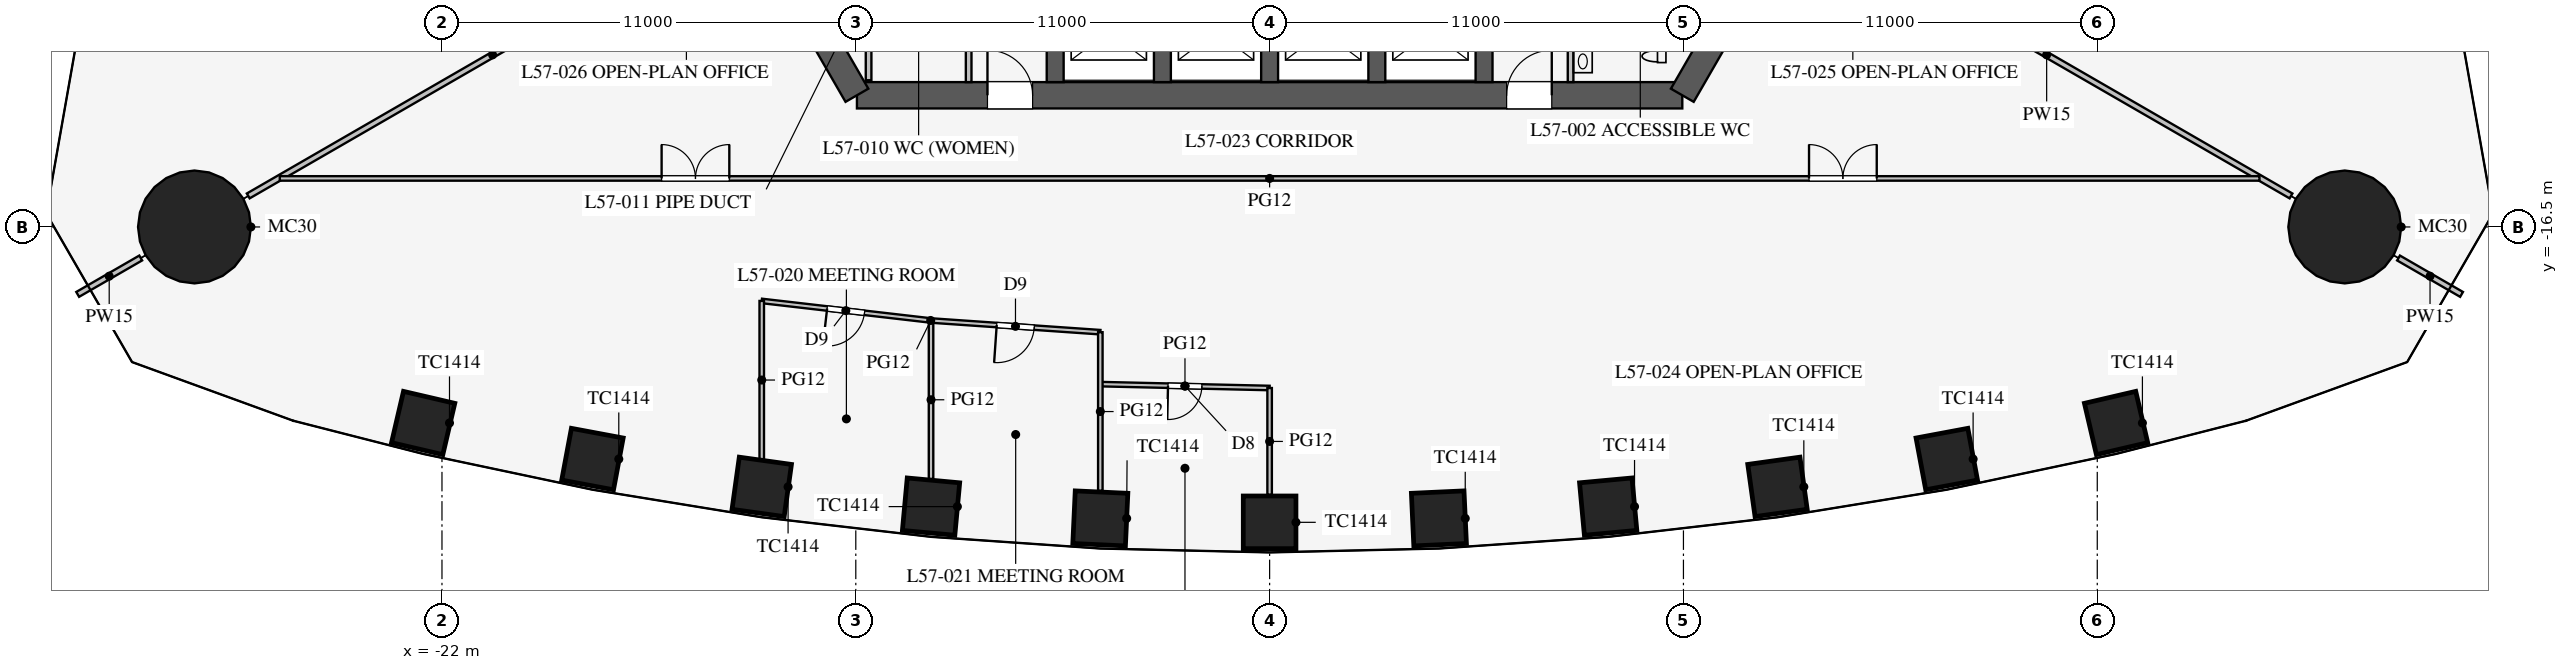
"""IFC4 building model, lengths in metres.
Left out: names, types, materials, properties, quantities, classifications, styles, units other than length and angle.
Written with IfcOpenShell. Run it as: python <this file> out.ifc"""

import sys

from ifc_helpers import new_model, si_unit, direction, frame, frame_2d, origin, origin_2d, place, context, subcontext, project, spatial, rectangle, circle, extrude, element, fill, save


model = new_model("IFC4")
c1 = context("Model", 3, precision=1e-05, world=origin(), true_north=direction((0.0, 1.0)))
c2 = subcontext(c1, "Body", "Model", "MODEL_VIEW")
j1 = project(units=[si_unit("LENGTHUNIT", "METRE"), si_unit("PLANEANGLEUNIT", "RADIAN")], contexts=[c1])
p1 = place(None, origin())
s1 = spatial("IfcSite", under=j1, at=p1, CompositionType="ELEMENT")
p2 = place(p1, origin())
s2 = spatial("IfcBuilding", under=s1, at=p2, CompositionType="ELEMENT")
p3 = place(p2, frame((0.0, 0.0, 248.5)))
s3 = spatial("IfcBuildingStorey", under=s2, at=p3, CompositionType="ELEMENT", Elevation=248.5)
for number, where, z_axis, x_axis in (
    (1, (-22.5, -21.71, 0.0), (0.0, 0.0, 1.0), (0.974, -0.227, 0.0)),
    (2, (-18.0, -22.669, 0.0), (0.0, 0.0, 1.0), (0.983, -0.184, 0.0)),
    (3, (-13.5, -23.408, 0.0), (0.0, 0.0, 1.0), (0.99, -0.138, 0.0)),
    (4, (-9.0, -23.933, 0.0), (0.0, 0.0, 1.0), (0.996, -0.092, 0.0)),
    (5, (-4.5, -24.246, 0.0), (0.0, 0.0, 1.0), (0.999, -0.046, 0.0)),
    (6, (0.0, -24.351, 0.0), (0.0, 0.0, 1.0), (1.0, 0.0, 0.0)),
    (7, (4.5, -24.246, 0.0), (0.0, 0.0, 1.0), (0.999, 0.046, 0.0)),
    (8, (9.0, -23.933, 0.0), (0.0, 0.0, 1.0), (0.996, 0.092, 0.0)),
    (9, (13.5, -23.408, 0.0), (0.0, 0.0, 1.0), (0.99, 0.138, 0.0)),
    (10, (18.0, -22.669, 0.0), (0.0, 0.0, 1.0), (0.983, 0.184, 0.0)),
    (11, (22.5, -21.71, 0.0), (0.0, 0.0, 1.0), (0.974, 0.227, 0.0)),
):
    element("IfcColumn", number, at=place(p3, frame(where, z_axis=z_axis, x_axis=x_axis)), inside=s3, PredefinedType="COLUMN", context=c2, shape_type="SweptSolid", body=[
        extrude(rectangle(XDim=1.4, YDim=1.4, at=origin_2d()), origin(), (0.0, 0.0, 1.0), 4.2),
    ])
for number, where, z_axis, x_axis in (
    (12, (28.579, -16.5, 0.0), (0.0, 0.0, 1.0), (1.0, 0.0, 0.0)),
    (13, (-28.579, -16.5, 0.0), (0.0, 0.0, 1.0), (1.0, 0.0, 0.0)),
):
    element("IfcColumn", number, at=place(p3, frame(where, z_axis=z_axis, x_axis=x_axis)), inside=s3, PredefinedType="COLUMN", context=c2, shape_type="SweptSolid", body=[
        extrude(circle(Radius=1.5, at=origin_2d()), origin(), (0.0, 0.0, 1.0), 4.2),
    ])
p4 = place(p3, frame((-10.97, -13.0, 0.0), z_axis=(0.0, 0.0, 1.0), x_axis=(1.0, 0.0, 0.0)))
e14 = element("IfcWall", 14, at=p4, inside=s3, PredefinedType="SHEAR", context=c2, shape_type="SweptSolid", body=[
    extrude(rectangle(XDim=21.939, YDim=0.7, at=frame_2d((10.97, 0.0))), origin(), (0.0, 0.0, 1.0), 4.2),
])
p5 = place(p4, frame((17.27, 0.0, 0.0)))
e15 = element("IfcOpeningElement", 15, at=p5, cuts=e14, PredefinedType="OPENING", context=c2, shape_type="SweptSolid", body=[
    extrude(rectangle(XDim=1.2, YDim=2.1, at=frame_2d((0.6, 1.05))), frame((0.0, 0.36, 0.0), z_axis=(0.0, -1.0, 0.0), x_axis=(1.0, 0.0, 0.0)), (0.0, 0.0, 1.0), 0.72),
])
p6 = place(p4, frame((3.47, 0.0, 0.0)))
e16 = element("IfcOpeningElement", 16, at=p6, cuts=e14, PredefinedType="OPENING", context=c2, shape_type="SweptSolid", body=[
    extrude(rectangle(XDim=1.2, YDim=2.1, at=frame_2d((0.6, 1.05))), frame((0.0, 0.36, 0.0), z_axis=(0.0, -1.0, 0.0), x_axis=(1.0, 0.0, 0.0)), (0.0, 0.0, 1.0), 0.72),
])
for number, where, z_axis, x_axis in (
    (17, (10.97, -13.0, 0.0), (0.0, 0.0, 1.0), (0.5, 0.866, 0.0)),
    (18, (-16.743, -3.0, 0.0), (0.0, 0.0, 1.0), (0.5, -0.866, 0.0)),
):
    element("IfcWall", number, at=place(p3, frame(where, z_axis=z_axis, x_axis=x_axis)), inside=s3, PredefinedType="SHEAR", context=c2, shape_type="SweptSolid", body=[
        extrude(rectangle(XDim=11.547, YDim=0.7, at=frame_2d((5.773, 0.0))), origin(), (0.0, 0.0, 1.0), 4.2),
    ])
for number, where, z_axis, x_axis in (
    (19, (-5.7, -10.025, 0.0), (0.0, 0.0, 1.0), (0.0, -1.0, 0.0)),
    (20, (-2.85, -10.025, 0.0), (0.0, 0.0, 1.0), (0.0, -1.0, 0.0)),
    (21, (0.0, -10.025, 0.0), (0.0, 0.0, 1.0), (0.0, -1.0, 0.0)),
    (22, (2.85, -10.025, 0.0), (0.0, 0.0, 1.0), (0.0, -1.0, 0.0)),
    (23, (5.7, -10.025, 0.0), (0.0, 0.0, 1.0), (0.0, -1.0, 0.0)),
):
    element("IfcWall", number, at=place(p3, frame(where, z_axis=z_axis, x_axis=x_axis)), inside=s3, PredefinedType="SHEAR", context=c2, shape_type="SweptSolid", body=[
        extrude(rectangle(XDim=2.625, YDim=0.45, at=frame_2d((1.312, 0.0))), origin(), (0.0, 0.0, 1.0), 4.2),
    ])
p7 = place(p3, frame((8.0, -7.5, 0.0), z_axis=(0.0, 0.0, 1.0), x_axis=(0.0, -1.0, 0.0)))
e24 = element("IfcWall", 24, at=p7, inside=s3, PredefinedType="PARTITIONING", context=c2, shape_type="SweptSolid", body=[
    extrude(rectangle(XDim=5.15, YDim=0.15, at=frame_2d((2.575, 0.0))), origin(), (0.0, 0.0, 1.0), 4.0),
])
p8 = place(p7, frame((2.6, 0.0, 0.0)))
e25 = element("IfcOpeningElement", 25, at=p8, cuts=e24, PredefinedType="OPENING", context=c2, shape_type="SweptSolid", body=[
    extrude(rectangle(XDim=0.9, YDim=2.1, at=frame_2d((0.45, 1.05))), frame((0.0, 0.085, 0.0), z_axis=(0.0, -1.0, 0.0), x_axis=(1.0, 0.0, 0.0)), (0.0, 0.0, 1.0), 0.17),
])
p9 = place(p3, frame((-8.0, -7.5, 0.0), z_axis=(0.0, 0.0, 1.0), x_axis=(0.0, -1.0, 0.0)))
e26 = element("IfcWall", 26, at=p9, inside=s3, PredefinedType="PARTITIONING", context=c2, shape_type="SweptSolid", body=[
    extrude(rectangle(XDim=5.15, YDim=0.15, at=frame_2d((2.575, 0.0))), origin(), (0.0, 0.0, 1.0), 4.0),
])
p10 = place(p9, frame((2.6, 0.0, 0.0)))
e27 = element("IfcOpeningElement", 27, at=p10, cuts=e26, PredefinedType="OPENING", context=c2, shape_type="SweptSolid", body=[
    extrude(rectangle(XDim=0.9, YDim=2.1, at=frame_2d((0.45, 1.05))), frame((0.0, 0.085, 0.0), z_axis=(0.0, -1.0, 0.0), x_axis=(1.0, 0.0, 0.0)), (0.0, 0.0, 1.0), 0.17),
])
p11 = place(p3, frame((-10.66, -8.5, 0.0), z_axis=(0.0, 0.0, 1.0), x_axis=(0.0, -1.0, 0.0)))
e28 = element("IfcWall", 28, at=p11, inside=s3, PredefinedType="PARTITIONING", context=c2, shape_type="SweptSolid", body=[
    extrude(rectangle(XDim=4.1, YDim=0.15, at=frame_2d((2.05, 0.0))), origin(), (0.0, 0.0, 1.0), 4.0),
])
p12 = place(p3, frame((14.159, -8.175, 0.0), z_axis=(0.0, 0.0, 1.0), x_axis=(0.866027028085, -0.499997186618, 0.0)))
e29 = element("IfcWall", 29, at=p12, inside=s3, PredefinedType="PARTITIONING", context=c2, shape_type="SweptSolid", body=[
    extrude(rectangle(XDim=15.0, YDim=0.15, at=frame_2d((7.5, 0.0))), origin(), (0.0, 0.0, 1.0), 2.4),
])
p13 = place(p3, frame((30.008, -17.325, 0.0), z_axis=(0.0, 0.0, 1.0), x_axis=(0.866013246922, -0.500021055713, 0.0)))
e30 = element("IfcWall", 30, at=p13, inside=s3, PredefinedType="PARTITIONING", context=c2, shape_type="SweptSolid", body=[
    extrude(rectangle(XDim=1.935, YDim=0.15, at=frame_2d((0.967, 0.0))), origin(), (0.0, 0.0, 1.0), 2.4),
])
p14 = place(p3, frame((-14.159, -8.175, 0.0), z_axis=(0.0, 0.0, 1.0), x_axis=(-0.866027028085, -0.499997186618, 0.0)))
e31 = element("IfcWall", 31, at=p14, inside=s3, PredefinedType="PARTITIONING", context=c2, shape_type="SweptSolid", body=[
    extrude(rectangle(XDim=15.0, YDim=0.15, at=frame_2d((7.5, 0.0))), origin(), (0.0, 0.0, 1.0), 2.4),
])
p15 = place(p3, frame((-30.008, -17.325, 0.0), z_axis=(0.0, 0.0, 1.0), x_axis=(-0.866013246922, -0.500021055713, 0.0)))
e32 = element("IfcWall", 32, at=p15, inside=s3, PredefinedType="PARTITIONING", context=c2, shape_type="SweptSolid", body=[
    extrude(rectangle(XDim=1.935, YDim=0.15, at=frame_2d((0.967, 0.0))), origin(), (0.0, 0.0, 1.0), 2.4),
])
p16 = place(p3, frame((-26.312, -15.21, 0.0), z_axis=(0.0, 0.0, 1.0), x_axis=(1.0, 0.0, 0.0)))
e33 = element("IfcWall", 33, at=p16, inside=s3, PredefinedType="PARTITIONING", context=c2, shape_type="SweptSolid", body=[
    extrude(rectangle(XDim=52.624, YDim=0.12, at=frame_2d((26.312, 0.0))), origin(), (0.0, 0.0, 1.0), 2.9),
])
p17 = place(p16, frame((10.15, 0.0, 0.15)))
e34 = element("IfcOpeningElement", 34, at=p17, cuts=e33, PredefinedType="OPENING", context=c2, shape_type="SweptSolid", body=[
    extrude(rectangle(XDim=1.8, YDim=2.1, at=frame_2d((0.9, 1.05))), frame((0.0, 0.07, 0.0), z_axis=(0.0, -1.0, 0.0), x_axis=(1.0, 0.0, 0.0)), (0.0, 0.0, 1.0), 0.14),
])
p18 = place(p16, frame((40.65, 0.0, 0.15)))
e35 = element("IfcOpeningElement", 35, at=p18, cuts=e33, PredefinedType="OPENING", context=c2, shape_type="SweptSolid", body=[
    extrude(rectangle(XDim=1.8, YDim=2.1, at=frame_2d((0.9, 1.05))), frame((0.0, 0.07, 0.0), z_axis=(0.0, -1.0, 0.0), x_axis=(1.0, 0.0, 0.0)), (0.0, 0.0, 1.0), 0.14),
])
p19 = place(p3, frame((-13.5, -18.466, 0.0), z_axis=(0.0, 0.0, 1.0), x_axis=(0.993382946625, -0.114849124309, 0.0)))
e36 = element("IfcWall", 36, at=p19, inside=s3, PredefinedType="PARTITIONING", context=c2, shape_type="SweptSolid", body=[
    extrude(rectangle(XDim=4.53, YDim=0.12, at=frame_2d((2.265, 0.0))), origin(), (0.0, 0.0, 1.0), 2.9),
])
p20 = place(p19, frame((1.75, 0.0, 0.15)))
e37 = element("IfcOpeningElement", 37, at=p20, cuts=e36, PredefinedType="OPENING", context=c2, shape_type="SweptSolid", body=[
    extrude(rectangle(XDim=1.0, YDim=2.1, at=frame_2d((0.5, 1.05))), frame((0.0, 0.07, 0.0), z_axis=(0.0, -1.0, 0.0), x_axis=(1.0, 0.0, 0.0)), (0.0, 0.0, 1.0), 0.14),
])
p21 = place(p3, frame((-4.5, -20.677, 0.0), z_axis=(0.0, 0.0, 1.0), x_axis=(0.99973677065, -0.022943177842, 0.0)))
e38 = element("IfcWall", 38, at=p21, inside=s3, PredefinedType="PARTITIONING", context=c2, shape_type="SweptSolid", body=[
    extrude(rectangle(XDim=4.501, YDim=0.12, at=frame_2d((2.25, 0.0))), origin(), (0.0, 0.0, 1.0), 2.9),
])
p22 = place(p21, frame((1.8, 0.0, 0.15)))
e39 = element("IfcOpeningElement", 39, at=p22, cuts=e38, PredefinedType="OPENING", context=c2, shape_type="SweptSolid", body=[
    extrude(rectangle(XDim=0.9, YDim=2.1, at=frame_2d((0.45, 1.05))), frame((0.0, 0.07, 0.0), z_axis=(0.0, -1.0, 0.0), x_axis=(1.0, 0.0, 0.0)), (0.0, 0.0, 1.0), 0.14),
])
p23 = place(p3, frame((-9.0, -18.986, 0.0), z_axis=(0.0, 0.0, 1.0), x_axis=(0.997623533978, -0.068900540297, 0.0)))
e40 = element("IfcWall", 40, at=p23, inside=s3, PredefinedType="PARTITIONING", context=c2, shape_type="SweptSolid", body=[
    extrude(rectangle(XDim=4.511, YDim=0.12, at=frame_2d((2.255, 0.0))), origin(), (0.0, 0.0, 1.0), 2.9),
])
p24 = place(p23, frame((1.75, 0.0, 0.15)))
e41 = element("IfcOpeningElement", 41, at=p24, cuts=e40, PredefinedType="OPENING", context=c2, shape_type="SweptSolid", body=[
    extrude(rectangle(XDim=1.0, YDim=2.1, at=frame_2d((0.5, 1.05))), frame((0.0, 0.07, 0.0), z_axis=(0.0, -1.0, 0.0), x_axis=(1.0, 0.0, 0.0)), (0.0, 0.0, 1.0), 0.14),
])
p25 = place(p3, frame((0.0, -20.781, 0.0), z_axis=(0.0, 0.0, 1.0), x_axis=(0.0, -1.0, 0.0)))
e42 = element("IfcWall", 42, at=p25, inside=s3, PredefinedType="PARTITIONING", context=c2, shape_type="SweptSolid", body=[
    extrude(rectangle(XDim=2.84, YDim=0.12, at=frame_2d((1.42, 0.0))), origin(), (0.0, 0.0, 1.0), 2.9),
])
p26 = place(p3, frame((-13.5, -18.466, 0.0), z_axis=(0.0, 0.0, 1.0), x_axis=(0.0, -1.0, 0.0)))
e43 = element("IfcWall", 43, at=p26, inside=s3, PredefinedType="PARTITIONING", context=c2, shape_type="SweptSolid", body=[
    extrude(rectangle(XDim=4.205, YDim=0.12, at=frame_2d((2.103, 0.0))), origin(), (0.0, 0.0, 1.0), 2.8),
])
p27 = place(p3, frame((-4.5, -19.297, 0.0), z_axis=(0.0, 0.0, 1.0), x_axis=(0.0, -1.0, 0.0)))
e44 = element("IfcWall", 44, at=p27, inside=s3, PredefinedType="PARTITIONING", context=c2, shape_type="SweptSolid", body=[
    extrude(rectangle(XDim=4.219, YDim=0.12, at=frame_2d((2.109, 0.0))), origin(), (0.0, 0.0, 1.0), 2.9),
])
p28 = place(p3, frame((-9.0, -18.986, 0.0), z_axis=(0.0, 0.0, 1.0), x_axis=(0.0, -1.0, 0.0)))
e45 = element("IfcWall", 45, at=p28, inside=s3, PredefinedType="PARTITIONING", context=c2, shape_type="SweptSolid", body=[
    extrude(rectangle(XDim=4.214, YDim=0.12, at=frame_2d((2.107, 0.0))), origin(), (0.0, 0.0, 1.0), 2.9),
])
p29 = place(p5, origin())
e46 = element("IfcDoor", 46, at=p29, inside=s3, OperationType="SINGLE_SWING_RIGHT", PredefinedType="DOOR", context=c2, shape_type="SweptSolid", body=[
    extrude(rectangle(XDim=1.2, YDim=2.1, at=frame_2d((0.6, 1.05))), frame((0.0, 0.025, 0.0), z_axis=(0.0, -1.0, 0.0), x_axis=(1.0, 0.0, 0.0)), (0.0, 0.0, 1.0), 0.05),
])
fill(e15, e46)
p30 = place(p6, origin())
e47 = element("IfcDoor", 47, at=p30, inside=s3, OperationType="SINGLE_SWING_LEFT", PredefinedType="DOOR", context=c2, shape_type="SweptSolid", body=[
    extrude(rectangle(XDim=1.2, YDim=2.1, at=frame_2d((0.6, 1.05))), frame((0.0, 0.025, 0.0), z_axis=(0.0, -1.0, 0.0), x_axis=(1.0, 0.0, 0.0)), (0.0, 0.0, 1.0), 0.05),
])
fill(e16, e47)
p31 = place(p20, frame((1.0, 0.0, 0.0), z_axis=(0.0, 0.0, 1.0), x_axis=(-1.0, 0.0, 0.0)))
e48 = element("IfcDoor", 48, at=p31, inside=s3, OperationType="SINGLE_SWING_RIGHT", PredefinedType="DOOR", context=c2, shape_type="SweptSolid", body=[
    extrude(rectangle(XDim=1.0, YDim=2.1, at=frame_2d((0.5, 1.05))), frame((0.0, 0.025, 0.0), z_axis=(0.0, -1.0, 0.0), x_axis=(1.0, 0.0, 0.0)), (0.0, 0.0, 1.0), 0.05),
])
fill(e37, e48)
p32 = place(p24, frame((1.0, 0.0, 0.0), z_axis=(0.0, 0.0, 1.0), x_axis=(-1.0, 0.0, 0.0)))
e49 = element("IfcDoor", 49, at=p32, inside=s3, OperationType="SINGLE_SWING_RIGHT", PredefinedType="DOOR", context=c2, shape_type="SweptSolid", body=[
    extrude(rectangle(XDim=1.0, YDim=2.1, at=frame_2d((0.5, 1.05))), frame((0.0, 0.025, 0.0), z_axis=(0.0, -1.0, 0.0), x_axis=(1.0, 0.0, 0.0)), (0.0, 0.0, 1.0), 0.05),
])
fill(e41, e49)
p33 = place(p22, frame((0.9, 0.0, 0.0), z_axis=(0.0, 0.0, 1.0), x_axis=(-1.0, 0.0, 0.0)))
e50 = element("IfcDoor", 50, at=p33, inside=s3, OperationType="SINGLE_SWING_RIGHT", PredefinedType="DOOR", context=c2, shape_type="SweptSolid", body=[
    extrude(rectangle(XDim=0.9, YDim=2.1, at=frame_2d((0.45, 1.05))), frame((0.0, 0.025, 0.0), z_axis=(0.0, -1.0, 0.0), x_axis=(1.0, 0.0, 0.0)), (0.0, 0.0, 1.0), 0.05),
])
fill(e39, e50)
p34 = place(p17, origin())
e51 = element("IfcDoor", 51, at=p34, inside=s3, OperationType="DOUBLE_DOOR_SINGLE_SWING", PredefinedType="DOOR", context=c2, shape_type="SweptSolid", body=[
    extrude(rectangle(XDim=1.8, YDim=2.1, at=frame_2d((0.9, 1.05))), frame((0.0, 0.025, 0.0), z_axis=(0.0, -1.0, 0.0), x_axis=(1.0, 0.0, 0.0)), (0.0, 0.0, 1.0), 0.05),
])
fill(e34, e51)
p35 = place(p18, origin())
e52 = element("IfcDoor", 52, at=p35, inside=s3, OperationType="DOUBLE_DOOR_SINGLE_SWING", PredefinedType="DOOR", context=c2, shape_type="SweptSolid", body=[
    extrude(rectangle(XDim=1.8, YDim=2.1, at=frame_2d((0.9, 1.05))), frame((0.0, 0.025, 0.0), z_axis=(0.0, -1.0, 0.0), x_axis=(1.0, 0.0, 0.0)), (0.0, 0.0, 1.0), 0.05),
])
fill(e35, e52)
save(model, sys.argv[1])
